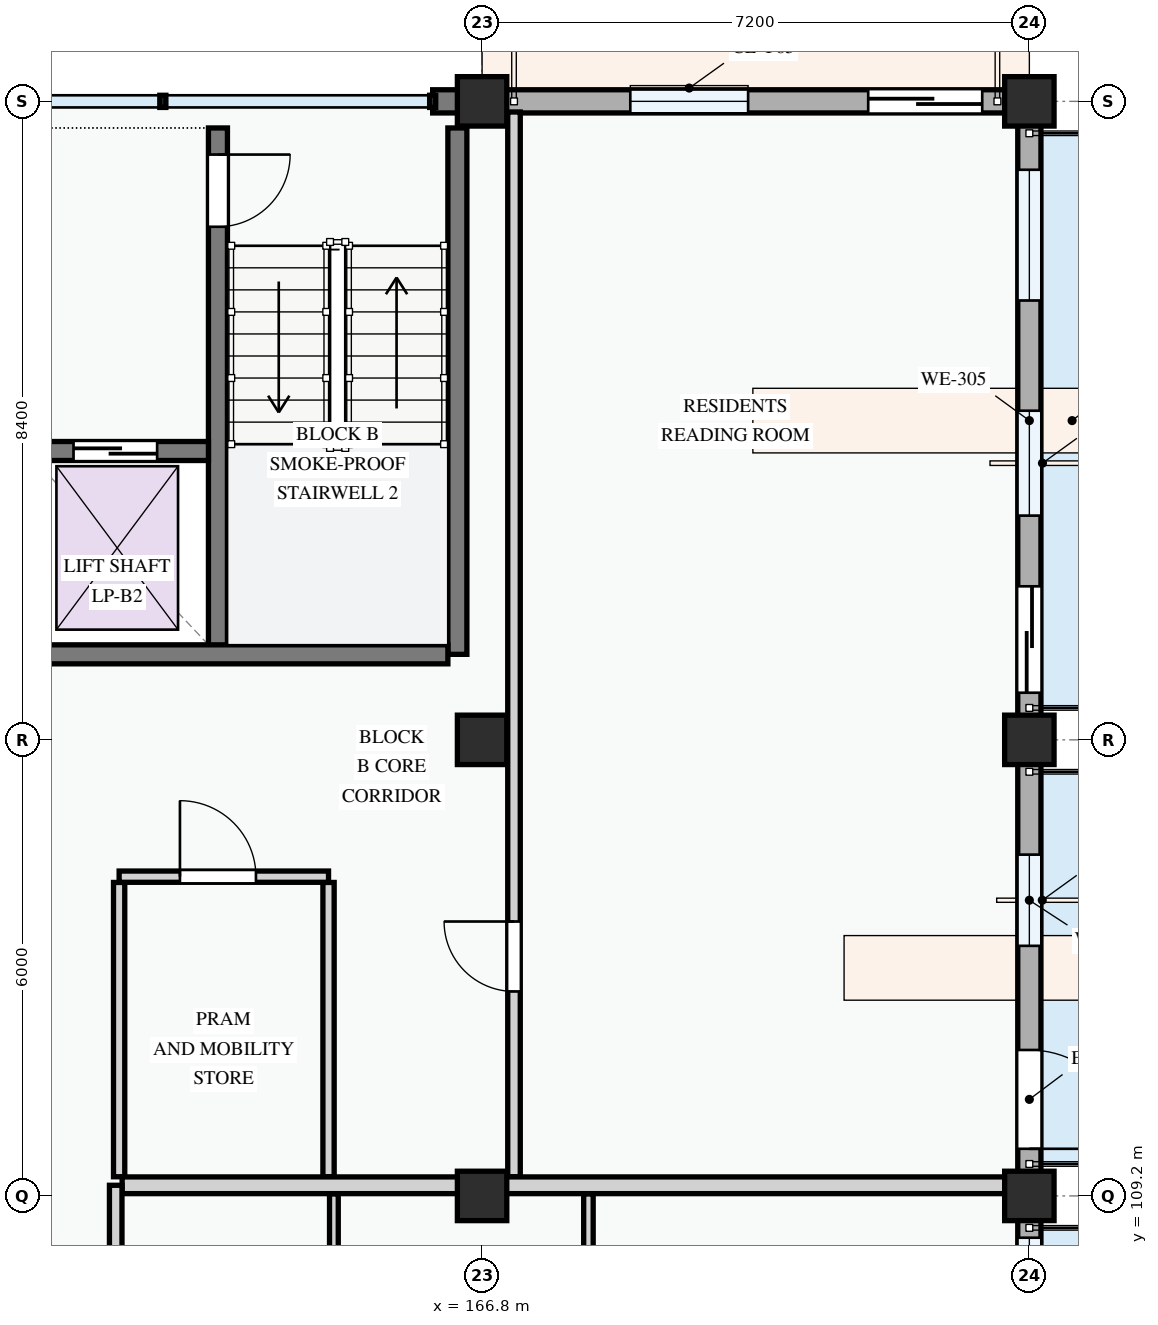
"""IFC4 building model, lengths in metres.
Left out: names, types, materials, properties, quantities, classifications, styles, units other than length and angle.
Written with IfcOpenShell. Run it as: python <this file> out.ifc"""

import sys

from ifc_helpers import new_model, si_unit, direction, frame, frame_2d, origin, origin_2d, place, context, subcontext, project, spatial, rectangle, extrude, element, fill, save


model = new_model("IFC4")
c1 = context("Model", 3, precision=1e-05, world=origin(), true_north=direction((0.0, 1.0)))
c2 = subcontext(c1, "Body", "Model", "MODEL_VIEW")
j1 = project(units=[si_unit("LENGTHUNIT", "METRE"), si_unit("PLANEANGLEUNIT", "RADIAN")], contexts=[c1])
p1 = place(None, origin())
s1 = spatial("IfcSite", under=j1, at=p1, CompositionType="ELEMENT")
p2 = place(p1, origin())
s2 = spatial("IfcBuilding", under=s1, at=p2, CompositionType="ELEMENT")
p3 = place(p2, frame((0.0, 0.0, 21.3)))
s3 = spatial("IfcBuildingStorey", under=s2, at=p3, CompositionType="ELEMENT", Elevation=21.3)
for number, where, z_axis, x_axis in (
    (1, (166.8, 109.2, 0.0), (0.0, 0.0, 1.0), (1.0, 0.0, 0.0)),
    (2, (166.8, 115.2, 0.0), (0.0, 0.0, 1.0), (1.0, 0.0, 0.0)),
    (3, (166.8, 123.6, 0.0), (0.0, 0.0, 1.0), (1.0, 0.0, 0.0)),
    (4, (174.0, 109.2, 0.0), (0.0, 0.0, 1.0), (1.0, 0.0, 0.0)),
    (5, (174.0, 115.2, 0.0), (0.0, 0.0, 1.0), (1.0, 0.0, 0.0)),
    (6, (174.0, 123.6, 0.0), (0.0, 0.0, 1.0), (1.0, 0.0, 0.0)),
):
    element("IfcColumn", number, at=place(p3, frame(where, z_axis=z_axis, x_axis=x_axis)), inside=s3, PredefinedType="COLUMN", context=c2, shape_type="SweptSolid", body=[
        extrude(rectangle(XDim=0.65, YDim=0.65, at=origin_2d()), origin(), (0.0, 0.0, 1.0), 3.3),
    ])
p4 = place(p3, frame((174.0, 109.2, 0.0), z_axis=(0.0, 0.0, 1.0), x_axis=(0.0, 1.0, 0.0)))
e7 = element("IfcWall", 7, at=p4, inside=s3, PredefinedType="STANDARD", context=c2, shape_type="SweptSolid", body=[
    extrude(rectangle(XDim=6.0, YDim=0.305, at=frame_2d((3.0, 0.0))), origin(), (0.0, 0.0, 1.0), 2.575),
])
p5 = place(p4, frame((0.62, 0.0, 0.0)))
e8 = element("IfcOpeningElement", 8, at=p5, cuts=e7, PredefinedType="OPENING", context=c2, shape_type="SweptSolid", body=[
    extrude(rectangle(XDim=1.3, YDim=2.15, at=frame_2d((0.65, 1.075))), frame((0.0, 0.163, 0.0), z_axis=(0.0, -1.0, 0.0), x_axis=(1.0, 0.0, 0.0)), (0.0, 0.0, 1.0), 0.325),
])
p6 = place(p4, frame((3.29, 0.0, 0.78)))
e9 = element("IfcOpeningElement", 9, at=p6, cuts=e7, PredefinedType="OPENING", context=c2, shape_type="SweptSolid", body=[
    extrude(rectangle(XDim=1.2, YDim=1.5, at=frame_2d((0.6, 0.75))), frame((0.0, 0.163, 0.0), z_axis=(0.0, -1.0, 0.0), x_axis=(1.0, 0.0, 0.0)), (0.0, 0.0, 1.0), 0.325),
])
p7 = place(p3, frame((174.0, 115.2, 0.0), z_axis=(0.0, 0.0, 1.0), x_axis=(0.0, 1.0, 0.0)))
e10 = element("IfcWall", 10, at=p7, inside=s3, PredefinedType="STANDARD", context=c2, shape_type="SweptSolid", body=[
    extrude(rectangle(XDim=8.4, YDim=0.305, at=frame_2d((4.2, 0.0))), origin(), (0.0, 0.0, 1.0), 2.425),
])
p8 = place(p7, frame((0.62, 0.0, 0.0)))
e11 = element("IfcOpeningElement", 11, at=p8, cuts=e10, PredefinedType="OPENING", context=c2, shape_type="SweptSolid", body=[
    extrude(rectangle(XDim=1.4, YDim=2.2, at=frame_2d((0.7, 1.1))), frame((0.0, 0.163, 0.0), z_axis=(0.0, -1.0, 0.0), x_axis=(1.0, 0.0, 0.0)), (0.0, 0.0, 1.0), 0.325),
])
p9 = place(p7, frame((2.95, 0.0, 0.78)))
e12 = element("IfcOpeningElement", 12, at=p9, cuts=e10, PredefinedType="OPENING", context=c2, shape_type="SweptSolid", body=[
    extrude(rectangle(XDim=1.38, YDim=1.48, at=frame_2d((0.69, 0.74))), frame((0.0, 0.163, 0.0), z_axis=(0.0, -1.0, 0.0), x_axis=(1.0, 0.0, 0.0)), (0.0, 0.0, 1.0), 0.325),
])
p10 = place(p7, frame((5.78, 0.0, 0.78)))
e13 = element("IfcOpeningElement", 13, at=p10, cuts=e10, PredefinedType="OPENING", context=c2, shape_type="SweptSolid", body=[
    extrude(rectangle(XDim=1.72, YDim=1.52, at=frame_2d((0.86, 0.76))), frame((0.0, 0.163, 0.0), z_axis=(0.0, -1.0, 0.0), x_axis=(1.0, 0.0, 0.0)), (0.0, 0.0, 1.0), 0.325),
])
p11 = place(p3, frame((174.0, 123.6, 0.0), z_axis=(0.0, 0.0, 1.0), x_axis=(-1.0, 0.0, 0.0)))
e14 = element("IfcWall", 14, at=p11, inside=s3, PredefinedType="STANDARD", context=c2, shape_type="SweptSolid", body=[
    extrude(rectangle(XDim=7.2, YDim=0.305, at=frame_2d((3.6, 0.0))), origin(), (0.0, 0.0, 1.0), 2.345),
])
p12 = place(p11, frame((0.62, 0.0, 0.0)))
e15 = element("IfcOpeningElement", 15, at=p12, cuts=e14, PredefinedType="OPENING", context=c2, shape_type="SweptSolid", body=[
    extrude(rectangle(XDim=1.5, YDim=2.2, at=frame_2d((0.75, 1.1))), frame((0.0, 0.163, 0.0), z_axis=(0.0, -1.0, 0.0), x_axis=(1.0, 0.0, 0.0)), (0.0, 0.0, 1.0), 0.325),
])
p13 = place(p11, frame((3.7, 0.0, 0.78)))
e16 = element("IfcOpeningElement", 16, at=p13, cuts=e14, PredefinedType="OPENING", context=c2, shape_type="SweptSolid", body=[
    extrude(rectangle(XDim=1.55, YDim=1.4, at=frame_2d((0.775, 0.7))), frame((0.0, 0.163, 0.0), z_axis=(0.0, -1.0, 0.0), x_axis=(1.0, 0.0, 0.0)), (0.0, 0.0, 1.0), 0.325),
])
p14 = place(p3, frame((166.8, 123.6, 0.0), z_axis=(0.0, 0.0, 1.0), x_axis=(-1.0, 0.0, 0.0)))
e17 = element("IfcWall", 17, at=p14, inside=s3, PredefinedType="STANDARD", context=c2, shape_type="SweptSolid", body=[
    extrude(rectangle(XDim=0.65, YDim=0.305, at=frame_2d((0.325, 0.0))), origin(), (0.0, 0.0, 1.0), 3.04),
])
p15 = place(p3, frame((174.0, 100.8, 0.0), z_axis=(0.0, 0.0, 1.0), x_axis=(0.0, 1.0, 0.0)))
e18 = element("IfcWall", 18, at=p15, inside=s3, PredefinedType="STANDARD", context=c2, shape_type="SweptSolid", body=[
    extrude(rectangle(XDim=8.4, YDim=0.305, at=frame_2d((4.2, 0.0))), origin(), (0.0, 0.0, 1.0), 2.425),
])
p16 = place(p15, frame((2.261, 0.0, 0.0)))
e19 = element("IfcOpeningElement", 19, at=p16, cuts=e18, PredefinedType="OPENING", context=c2, shape_type="SweptSolid", body=[
    extrude(rectangle(XDim=1.1, YDim=2.15, at=frame_2d((0.55, 1.075))), frame((0.0, 0.163, 0.0), z_axis=(0.0, -1.0, 0.0), x_axis=(1.0, 0.0, 0.0)), (0.0, 0.0, 1.0), 0.325),
])
p17 = place(p15, frame((0.585, 0.0, 0.78)))
e20 = element("IfcOpeningElement", 20, at=p17, cuts=e18, PredefinedType="OPENING", context=c2, shape_type="SweptSolid", body=[
    extrude(rectangle(XDim=0.95, YDim=1.15, at=frame_2d((0.475, 0.575))), frame((0.0, 0.163, 0.0), z_axis=(0.0, -1.0, 0.0), x_axis=(1.0, 0.0, 0.0)), (0.0, 0.0, 1.0), 0.325),
])
p18 = place(p15, frame((4.046, 0.0, 0.78)))
e21 = element("IfcOpeningElement", 21, at=p18, cuts=e18, PredefinedType="OPENING", context=c2, shape_type="SweptSolid", body=[
    extrude(rectangle(XDim=1.2, YDim=1.35, at=frame_2d((0.6, 0.675))), frame((0.0, 0.163, 0.0), z_axis=(0.0, -1.0, 0.0), x_axis=(1.0, 0.0, 0.0)), (0.0, 0.0, 1.0), 0.325),
])
p19 = place(p15, frame((6.1, 0.0, 0.78)))
e22 = element("IfcOpeningElement", 22, at=p19, cuts=e18, PredefinedType="OPENING", context=c2, shape_type="SweptSolid", body=[
    extrude(rectangle(XDim=1.75, YDim=1.45, at=frame_2d((0.875, 0.725))), frame((0.0, 0.163, 0.0), z_axis=(0.0, -1.0, 0.0), x_axis=(1.0, 0.0, 0.0)), (0.0, 0.0, 1.0), 0.325),
])
p20 = place(p3, frame((166.475, 123.25, 0.0), z_axis=(0.0, 0.0, 1.0), x_axis=(0.0, -1.0, 0.0)))
e23 = element("IfcWall", 23, at=p20, inside=s3, PredefinedType="SHEAR", context=c2, shape_type="SweptSolid", body=[
    extrude(rectangle(XDim=6.925, YDim=0.25, at=frame_2d((3.462, 0.0))), origin(), (0.0, 0.0, 1.0), 3.0),
])
p21 = place(p3, frame((163.325, 123.25, 0.0), z_axis=(0.0, 0.0, 1.0), x_axis=(0.0, -1.0, 0.0)))
e24 = element("IfcWall", 24, at=p21, inside=s3, PredefinedType="SHEAR", context=c2, shape_type="SweptSolid", body=[
    extrude(rectangle(XDim=6.925, YDim=0.25, at=frame_2d((3.462, 0.0))), origin(), (0.0, 0.0, 1.0), 3.0),
])
p22 = place(p21, frame((0.35, 0.0, 0.0)))
e25 = element("IfcOpeningElement", 25, at=p22, cuts=e24, PredefinedType="OPENING", context=c2, shape_type="SweptSolid", body=[
    extrude(rectangle(XDim=0.95, YDim=2.1, at=frame_2d((0.475, 1.05))), frame((0.0, 0.135, 0.0), z_axis=(0.0, -1.0, 0.0), x_axis=(1.0, 0.0, 0.0)), (0.0, 0.0, 1.0), 0.27),
])
p23 = place(p3, frame((160.775, 119.0, 0.0), z_axis=(0.0, 0.0, 1.0), x_axis=(1.0, 0.0, 0.0)))
e26 = element("IfcWall", 26, at=p23, inside=s3, PredefinedType="SHEAR", context=c2, shape_type="SweptSolid", body=[
    extrude(rectangle(XDim=2.425, YDim=0.25, at=frame_2d((1.212, 0.0))), origin(), (0.0, 0.0, 1.0), 3.0),
])
p24 = place(p23, frame((0.65, 0.0, 0.0)))
e27 = element("IfcOpeningElement", 27, at=p24, cuts=e26, PredefinedType="OPENING", context=c2, shape_type="SweptSolid", body=[
    extrude(rectangle(XDim=1.1, YDim=2.15, at=frame_2d((0.55, 1.075))), frame((0.0, 0.135, 0.0), z_axis=(0.0, -1.0, 0.0), x_axis=(1.0, 0.0, 0.0)), (0.0, 0.0, 1.0), 0.27),
])
p25 = place(p3, frame((152.85, 116.325, 0.0), z_axis=(0.0, 0.0, 1.0), x_axis=(1.0, 0.0, 0.0)))
e28 = element("IfcWall", 28, at=p25, inside=s3, PredefinedType="SHEAR", context=c2, shape_type="SweptSolid", body=[
    extrude(rectangle(XDim=13.5, YDim=0.25, at=frame_2d((6.75, 0.0))), origin(), (0.0, 0.0, 1.0), 3.0),
])
p26 = place(p25, frame((6.2, 0.0, 0.0)))
e29 = element("IfcOpeningElement", 29, at=p26, cuts=e28, PredefinedType="OPENING", context=c2, shape_type="SweptSolid", body=[
    extrude(rectangle(XDim=1.1, YDim=2.15, at=frame_2d((0.55, 1.075))), frame((0.0, 0.135, 0.0), z_axis=(0.0, -1.0, 0.0), x_axis=(1.0, 0.0, 0.0)), (0.0, 0.0, 1.0), 0.27),
])
for number, where, z_axis, x_axis in (
    (30, (162.025, 113.324, 0.0), (0.0, 0.0, 1.0), (0.0, -1.0, 0.0)),
    (31, (164.78, 113.324, 0.0), (0.0, 0.0, 1.0), (0.0, -1.0, 0.0)),
):
    element("IfcWall", number, at=place(p3, frame(where, z_axis=z_axis, x_axis=x_axis)), inside=s3, PredefinedType="PARTITIONING", context=c2, shape_type="SweptSolid", body=[
        extrude(rectangle(XDim=3.872, YDim=0.148, at=frame_2d((1.936, 0.0))), origin(), (0.0, 0.0, 1.0), 3.0),
    ])
p27 = place(p3, frame((162.025, 113.4, 0.0), z_axis=(0.0, 0.0, 1.0), x_axis=(1.0, 0.0, 0.0)))
e32 = element("IfcWall", 32, at=p27, inside=s3, PredefinedType="PARTITIONING", context=c2, shape_type="SweptSolid", body=[
    extrude(rectangle(XDim=2.755, YDim=0.148, at=frame_2d((1.377, 0.0))), origin(), (0.0, 0.0, 1.0), 3.0),
])
p28 = place(p27, frame((0.8, 0.0, 0.0)))
e33 = element("IfcOpeningElement", 33, at=p28, cuts=e32, PredefinedType="OPENING", context=c2, shape_type="SweptSolid", body=[
    extrude(rectangle(XDim=1.0, YDim=2.15, at=frame_2d((0.5, 1.075))), frame((0.0, 0.084, 0.0), z_axis=(0.0, -1.0, 0.0), x_axis=(1.0, 0.0, 0.0)), (0.0, 0.0, 1.0), 0.168),
])
p29 = place(p3, frame((167.22, 109.452, 0.0), z_axis=(0.0, 0.0, 1.0), x_axis=(0.0, 1.0, 0.0)))
e34 = element("IfcWall", 34, at=p29, inside=s3, PredefinedType="PARTITIONING", context=c2, shape_type="SweptSolid", body=[
    extrude(rectangle(XDim=14.008, YDim=0.165, at=frame_2d((7.004, 0.0))), origin(), (0.0, 0.0, 1.0), 2.425),
])
p30 = place(p29, frame((2.438, 0.0, 0.0)))
e35 = element("IfcOpeningElement", 35, at=p30, cuts=e34, PredefinedType="OPENING", context=c2, shape_type="SweptSolid", body=[
    extrude(rectangle(XDim=0.92, YDim=2.1, at=frame_2d((0.46, 1.05))), frame((0.0, 0.093, 0.0), z_axis=(0.0, -1.0, 0.0), x_axis=(1.0, 0.0, 0.0)), (0.0, 0.0, 1.0), 0.185),
])
p31 = place(p3, frame((168.199, 102.803, 0.0), z_axis=(0.0, 0.0, 1.0), x_axis=(0.0, 1.0, 0.0)))
e36 = element("IfcWall", 36, at=p31, inside=s3, PredefinedType="PARTITIONING", context=c2, shape_type="SweptSolid", body=[
    extrude(rectangle(XDim=6.425, YDim=0.125, at=frame_2d((3.213, 0.0))), origin(), (0.0, 0.0, 1.0), 3.0),
])
p32 = place(p3, frame((164.85, 102.803, 0.0), z_axis=(0.0, 0.0, 1.0), x_axis=(0.0, 1.0, 0.0)))
e37 = element("IfcWall", 37, at=p32, inside=s3, PredefinedType="PARTITIONING", context=c2, shape_type="SweptSolid", body=[
    extrude(rectangle(XDim=6.425, YDim=0.115, at=frame_2d((3.213, 0.0))), origin(), (0.0, 0.0, 1.0), 3.0),
])
p33 = place(p3, frame((162.064, 109.34, 0.0), z_axis=(0.0, 0.0, 1.0), x_axis=(1.0, 0.0, 0.0)))
e38 = element("IfcWall", 38, at=p33, inside=s3, PredefinedType="PARTITIONING", context=c2, shape_type="SweptSolid", body=[
    extrude(rectangle(XDim=11.781, YDim=0.22, at=frame_2d((5.891, 0.0))), origin(), (0.0, 0.0, 1.0), 2.375),
])
p34 = place(p3, frame((161.98, 80.554, 0.0), z_axis=(0.0, 0.0, 1.0), x_axis=(0.0, 1.0, 0.0)))
e39 = element("IfcWall", 39, at=p34, inside=s3, PredefinedType="PARTITIONING", context=c2, shape_type="SweptSolid", body=[
    extrude(rectangle(XDim=28.786, YDim=0.165, at=frame_2d((14.393, 0.0))), origin(), (0.0, 0.0, 1.0), 3.0),
])
p35 = place(p34, frame((2.352, 0.0, 0.0)))
e40 = element("IfcOpeningElement", 40, at=p35, cuts=e39, PredefinedType="OPENING", context=c2, shape_type="SweptSolid", body=[
    extrude(rectangle(XDim=0.96, YDim=2.12, at=frame_2d((0.48, 1.06))), frame((0.0, 0.093, 0.0), z_axis=(0.0, -1.0, 0.0), x_axis=(1.0, 0.0, 0.0)), (0.0, 0.0, 1.0), 0.185),
])
p36 = place(p34, frame((9.53, 0.0, 0.0)))
e41 = element("IfcOpeningElement", 41, at=p36, cuts=e39, PredefinedType="OPENING", context=c2, shape_type="SweptSolid", body=[
    extrude(rectangle(XDim=0.92, YDim=2.1, at=frame_2d((0.46, 1.05))), frame((0.0, 0.093, 0.0), z_axis=(0.0, -1.0, 0.0), x_axis=(1.0, 0.0, 0.0)), (0.0, 0.0, 1.0), 0.185),
])
p37 = place(p34, frame((16.76, 0.0, 0.0)))
e42 = element("IfcOpeningElement", 42, at=p37, cuts=e39, PredefinedType="OPENING", context=c2, shape_type="SweptSolid", body=[
    extrude(rectangle(XDim=0.92, YDim=2.1, at=frame_2d((0.46, 1.05))), frame((0.0, 0.093, 0.0), z_axis=(0.0, -1.0, 0.0), x_axis=(1.0, 0.0, 0.0)), (0.0, 0.0, 1.0), 0.185),
])
p38 = place(p5, frame((1.3, 0.0, 0.0), z_axis=(0.0, 0.0, 1.0), x_axis=(-1.0, 0.0, 0.0)))
e43 = element("IfcDoor", 43, at=p38, inside=s3, OperationType="SINGLE_SWING_RIGHT", PredefinedType="DOOR", context=c2, shape_type="SweptSolid", body=[
    extrude(rectangle(XDim=1.3, YDim=2.15, at=frame_2d((0.65, 1.075))), frame((0.0, 0.025, 0.0), z_axis=(0.0, -1.0, 0.0), x_axis=(1.0, 0.0, 0.0)), (0.0, 0.0, 1.0), 0.05),
])
fill(e8, e43)
p39 = place(p6, origin())
e44 = element("IfcWindow", 44, at=p39, inside=s3, PartitioningType="SINGLE_PANEL", PredefinedType="WINDOW", context=c2, shape_type="SweptSolid", body=[
    extrude(rectangle(XDim=1.2, YDim=1.5, at=frame_2d((0.6, 0.75))), frame((0.0, 0.03, 0.0), z_axis=(0.0, -1.0, 0.0), x_axis=(1.0, 0.0, 0.0)), (0.0, 0.0, 1.0), 0.06),
])
fill(e9, e44)
p40 = place(p8, frame((1.4, 0.0, 0.0), z_axis=(0.0, 0.0, 1.0), x_axis=(-1.0, 0.0, 0.0)))
e45 = element("IfcDoor", 45, at=p40, inside=s3, OperationType="SLIDING_TO_LEFT", PredefinedType="DOOR", context=c2, shape_type="SweptSolid", body=[
    extrude(rectangle(XDim=1.4, YDim=2.2, at=frame_2d((0.7, 1.1))), frame((0.0, 0.025, 0.0), z_axis=(0.0, -1.0, 0.0), x_axis=(1.0, 0.0, 0.0)), (0.0, 0.0, 1.0), 0.05),
])
fill(e11, e45)
p41 = place(p9, origin())
e46 = element("IfcWindow", 46, at=p41, inside=s3, PartitioningType="SINGLE_PANEL", PredefinedType="WINDOW", context=c2, shape_type="SweptSolid", body=[
    extrude(rectangle(XDim=1.38, YDim=1.48, at=frame_2d((0.69, 0.74))), frame((0.0, 0.03, 0.0), z_axis=(0.0, -1.0, 0.0), x_axis=(1.0, 0.0, 0.0)), (0.0, 0.0, 1.0), 0.06),
])
fill(e12, e46)
p42 = place(p10, origin())
e47 = element("IfcWindow", 47, at=p42, inside=s3, PartitioningType="DOUBLE_PANEL_VERTICAL", PredefinedType="WINDOW", context=c2, shape_type="SweptSolid", body=[
    extrude(rectangle(XDim=1.72, YDim=1.52, at=frame_2d((0.86, 0.76))), frame((0.0, 0.03, 0.0), z_axis=(0.0, -1.0, 0.0), x_axis=(1.0, 0.0, 0.0)), (0.0, 0.0, 1.0), 0.06),
])
fill(e13, e47)
p43 = place(p12, frame((1.5, 0.0, 0.0), z_axis=(0.0, 0.0, 1.0), x_axis=(-1.0, 0.0, 0.0)))
e48 = element("IfcDoor", 48, at=p43, inside=s3, OperationType="SLIDING_TO_RIGHT", PredefinedType="DOOR", context=c2, shape_type="SweptSolid", body=[
    extrude(rectangle(XDim=1.5, YDim=2.2, at=frame_2d((0.75, 1.1))), frame((0.0, 0.025, 0.0), z_axis=(0.0, -1.0, 0.0), x_axis=(1.0, 0.0, 0.0)), (0.0, 0.0, 1.0), 0.05),
])
fill(e15, e48)
p44 = place(p13, origin())
e49 = element("IfcWindow", 49, at=p44, inside=s3, PartitioningType="SINGLE_PANEL", PredefinedType="WINDOW", context=c2, shape_type="SweptSolid", body=[
    extrude(rectangle(XDim=1.55, YDim=1.4, at=frame_2d((0.775, 0.7))), frame((0.0, 0.03, 0.0), z_axis=(0.0, -1.0, 0.0), x_axis=(1.0, 0.0, 0.0)), (0.0, 0.0, 1.0), 0.06),
])
fill(e16, e49)
p45 = place(p19, origin())
e50 = element("IfcWindow", 50, at=p45, inside=s3, PartitioningType="DOUBLE_PANEL_VERTICAL", PredefinedType="WINDOW", context=c2, shape_type="SweptSolid", body=[
    extrude(rectangle(XDim=1.75, YDim=1.45, at=frame_2d((0.875, 0.725))), frame((0.0, 0.03, 0.0), z_axis=(0.0, -1.0, 0.0), x_axis=(1.0, 0.0, 0.0)), (0.0, 0.0, 1.0), 0.06),
])
fill(e22, e50)
p46 = place(p22, origin())
e51 = element("IfcDoor", 51, at=p46, inside=s3, OperationType="SINGLE_SWING_LEFT", PredefinedType="DOOR", context=c2, shape_type="SweptSolid", body=[
    extrude(rectangle(XDim=0.95, YDim=2.1, at=frame_2d((0.475, 1.05))), frame((0.0, 0.025, 0.0), z_axis=(0.0, -1.0, 0.0), x_axis=(1.0, 0.0, 0.0)), (0.0, 0.0, 1.0), 0.05),
])
fill(e25, e51)
p47 = place(p24, origin())
e52 = element("IfcDoor", 52, at=p47, inside=s3, OperationType="SLIDING_TO_LEFT", PredefinedType="DOOR", context=c2, shape_type="SweptSolid", body=[
    extrude(rectangle(XDim=1.1, YDim=2.15, at=frame_2d((0.55, 1.075))), frame((0.0, 0.025, 0.0), z_axis=(0.0, -1.0, 0.0), x_axis=(1.0, 0.0, 0.0)), (0.0, 0.0, 1.0), 0.05),
])
fill(e27, e52)
p48 = place(p28, origin())
e53 = element("IfcDoor", 53, at=p48, inside=s3, OperationType="SINGLE_SWING_LEFT", PredefinedType="DOOR", context=c2, shape_type="SweptSolid", body=[
    extrude(rectangle(XDim=1.0, YDim=2.15, at=frame_2d((0.5, 1.075))), frame((0.0, 0.025, 0.0), z_axis=(0.0, -1.0, 0.0), x_axis=(1.0, 0.0, 0.0)), (0.0, 0.0, 1.0), 0.05),
])
fill(e33, e53)
p49 = place(p30, origin())
e54 = element("IfcDoor", 54, at=p49, inside=s3, OperationType="SINGLE_SWING_RIGHT", PredefinedType="DOOR", context=c2, shape_type="SweptSolid", body=[
    extrude(rectangle(XDim=0.92, YDim=2.1, at=frame_2d((0.46, 1.05))), frame((0.0, 0.025, 0.0), z_axis=(0.0, -1.0, 0.0), x_axis=(1.0, 0.0, 0.0)), (0.0, 0.0, 1.0), 0.05),
])
fill(e35, e54)
save(model, sys.argv[1])
